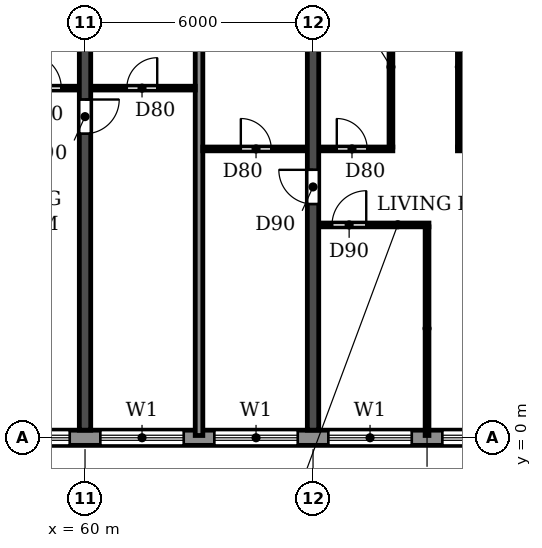
"""IFC4 building model, lengths in metres.
Left out: names, types, materials, properties, quantities, classifications, styles, units other than length and angle.
Written with IfcOpenShell. Run it as: python <this file> out.ifc"""

import sys

from ifc_helpers import new_model, si_unit, direction, frame, frame_2d, origin, place, context, subcontext, project, spatial, rectangle, extrude, element, fill, save


model = new_model("IFC4")
c1 = context("Model", 3, precision=1e-05, world=origin(), true_north=direction((0.0, 1.0)))
c2 = subcontext(c1, "Body", "Model", "MODEL_VIEW")
j1 = project(units=[si_unit("LENGTHUNIT", "METRE"), si_unit("PLANEANGLEUNIT", "RADIAN")], contexts=[c1])
p1 = place(None, origin())
s1 = spatial("IfcSite", under=j1, at=p1, CompositionType="ELEMENT")
p2 = place(p1, origin())
s2 = spatial("IfcBuilding", under=s1, at=p2, CompositionType="ELEMENT")
p3 = place(p2, frame((0.0, 0.0, 162.0)))
s3 = spatial("IfcBuildingStorey", under=s2, at=p3, CompositionType="ELEMENT", Elevation=162.0)
p4 = place(p3, frame((60.0, 0.2, 0.0), z_axis=(0.0, 0.0, 1.0), x_axis=(0.0, 1.0, 0.0)))
e1 = element("IfcWall", 1, at=p4, inside=s3, PredefinedType="SHEAR", context=c2, shape_type="SweptSolid", body=[
    extrude(rectangle(XDim=11.675, YDim=0.3, at=frame_2d((5.837, 0.0))), origin(), (0.0, 0.0, 1.0), 2.95),
])
p5 = place(p4, frame((7.8, 0.0, 0.0)))
e2 = element("IfcOpeningElement", 2, at=p5, cuts=e1, PredefinedType="OPENING", context=c2, shape_type="SweptSolid", body=[
    extrude(rectangle(XDim=0.9, YDim=2.1, at=frame_2d((0.45, 1.05))), frame((0.0, 0.16, 0.0), z_axis=(0.0, -1.0, 0.0), x_axis=(1.0, 0.0, 0.0)), (0.0, 0.0, 1.0), 0.32),
])
p6 = place(p3, frame((66.0, 0.2, 0.0), z_axis=(0.0, 0.0, 1.0), x_axis=(0.0, 1.0, 0.0)))
e3 = element("IfcWall", 3, at=p6, inside=s3, PredefinedType="SHEAR", context=c2, shape_type="SweptSolid", body=[
    extrude(rectangle(XDim=11.675, YDim=0.3, at=frame_2d((5.837, 0.0))), origin(), (0.0, 0.0, 1.0), 2.95),
])
p7 = place(p6, frame((5.95, 0.0, 0.0)))
e4 = element("IfcOpeningElement", 4, at=p7, cuts=e3, PredefinedType="OPENING", context=c2, shape_type="SweptSolid", body=[
    extrude(rectangle(XDim=0.9, YDim=2.1, at=frame_2d((0.45, 1.05))), frame((0.0, 0.16, 0.0), z_axis=(0.0, -1.0, 0.0), x_axis=(1.0, 0.0, 0.0)), (0.0, 0.0, 1.0), 0.32),
])
p8 = place(p3, frame((22.683, 0.0, 0.0), z_axis=(0.0, 0.0, 1.0), x_axis=(1.0, 0.0, 0.0)))
e5 = element("IfcWall", 5, at=p8, inside=s3, PredefinedType="STANDARD", context=c2, shape_type="SweptSolid", body=[
    extrude(rectangle(XDim=56.634, YDim=0.4, at=frame_2d((28.317, 0.0))), origin(), (0.0, 0.0, 1.0), 2.95),
])
p9 = place(p8, frame((1.717, 0.0, 0.9)))
e6 = element("IfcOpeningElement", 6, at=p9, cuts=e5, PredefinedType="OPENING", context=c2, shape_type="SweptSolid", body=[
    extrude(rectangle(XDim=2.2, YDim=1.5, at=frame_2d((1.1, 0.75))), frame((0.0, 0.21, 0.0), z_axis=(0.0, -1.0, 0.0), x_axis=(1.0, 0.0, 0.0)), (0.0, 0.0, 1.0), 0.42),
])
p10 = place(p8, frame((4.917, 0.0, 0.0)))
e7 = element("IfcOpeningElement", 7, at=p10, cuts=e5, PredefinedType="OPENING", context=c2, shape_type="SweptSolid", body=[
    extrude(rectangle(XDim=1.8, YDim=2.4, at=frame_2d((0.9, 1.2))), frame((0.0, 0.21, 0.0), z_axis=(0.0, -1.0, 0.0), x_axis=(1.0, 0.0, 0.0)), (0.0, 0.0, 1.0), 0.42),
])
p11 = place(p8, frame((7.717, 0.0, 0.9)))
e8 = element("IfcOpeningElement", 8, at=p11, cuts=e5, PredefinedType="OPENING", context=c2, shape_type="SweptSolid", body=[
    extrude(rectangle(XDim=2.2, YDim=1.5, at=frame_2d((1.1, 0.75))), frame((0.0, 0.21, 0.0), z_axis=(0.0, -1.0, 0.0), x_axis=(1.0, 0.0, 0.0)), (0.0, 0.0, 1.0), 0.42),
])
p12 = place(p8, frame((10.717, 0.0, 0.9)))
e9 = element("IfcOpeningElement", 9, at=p12, cuts=e5, PredefinedType="OPENING", context=c2, shape_type="SweptSolid", body=[
    extrude(rectangle(XDim=2.2, YDim=1.5, at=frame_2d((1.1, 0.75))), frame((0.0, 0.21, 0.0), z_axis=(0.0, -1.0, 0.0), x_axis=(1.0, 0.0, 0.0)), (0.0, 0.0, 1.0), 0.42),
])
p13 = place(p8, frame((13.717, 0.0, 0.9)))
e10 = element("IfcOpeningElement", 10, at=p13, cuts=e5, PredefinedType="OPENING", context=c2, shape_type="SweptSolid", body=[
    extrude(rectangle(XDim=2.2, YDim=1.5, at=frame_2d((1.1, 0.75))), frame((0.0, 0.21, 0.0), z_axis=(0.0, -1.0, 0.0), x_axis=(1.0, 0.0, 0.0)), (0.0, 0.0, 1.0), 0.42),
])
p14 = place(p8, frame((16.917, 0.0, 0.0)))
e11 = element("IfcOpeningElement", 11, at=p14, cuts=e5, PredefinedType="OPENING", context=c2, shape_type="SweptSolid", body=[
    extrude(rectangle(XDim=1.8, YDim=2.4, at=frame_2d((0.9, 1.2))), frame((0.0, 0.21, 0.0), z_axis=(0.0, -1.0, 0.0), x_axis=(1.0, 0.0, 0.0)), (0.0, 0.0, 1.0), 0.42),
])
p15 = place(p8, frame((19.717, 0.0, 0.9)))
e12 = element("IfcOpeningElement", 12, at=p15, cuts=e5, PredefinedType="OPENING", context=c2, shape_type="SweptSolid", body=[
    extrude(rectangle(XDim=2.2, YDim=1.5, at=frame_2d((1.1, 0.75))), frame((0.0, 0.21, 0.0), z_axis=(0.0, -1.0, 0.0), x_axis=(1.0, 0.0, 0.0)), (0.0, 0.0, 1.0), 0.42),
])
p16 = place(p8, frame((22.717, 0.0, 0.9)))
e13 = element("IfcOpeningElement", 13, at=p16, cuts=e5, PredefinedType="OPENING", context=c2, shape_type="SweptSolid", body=[
    extrude(rectangle(XDim=2.2, YDim=1.5, at=frame_2d((1.1, 0.75))), frame((0.0, 0.21, 0.0), z_axis=(0.0, -1.0, 0.0), x_axis=(1.0, 0.0, 0.0)), (0.0, 0.0, 1.0), 0.42),
])
p17 = place(p8, frame((25.717, 0.0, 0.9)))
e14 = element("IfcOpeningElement", 14, at=p17, cuts=e5, PredefinedType="OPENING", context=c2, shape_type="SweptSolid", body=[
    extrude(rectangle(XDim=2.2, YDim=1.5, at=frame_2d((1.1, 0.75))), frame((0.0, 0.21, 0.0), z_axis=(0.0, -1.0, 0.0), x_axis=(1.0, 0.0, 0.0)), (0.0, 0.0, 1.0), 0.42),
])
p18 = place(p8, frame((28.717, 0.0, 0.9)))
e15 = element("IfcOpeningElement", 15, at=p18, cuts=e5, PredefinedType="OPENING", context=c2, shape_type="SweptSolid", body=[
    extrude(rectangle(XDim=2.2, YDim=1.5, at=frame_2d((1.1, 0.75))), frame((0.0, 0.21, 0.0), z_axis=(0.0, -1.0, 0.0), x_axis=(1.0, 0.0, 0.0)), (0.0, 0.0, 1.0), 0.42),
])
p19 = place(p8, frame((31.717, 0.0, 0.9)))
e16 = element("IfcOpeningElement", 16, at=p19, cuts=e5, PredefinedType="OPENING", context=c2, shape_type="SweptSolid", body=[
    extrude(rectangle(XDim=2.2, YDim=1.5, at=frame_2d((1.1, 0.75))), frame((0.0, 0.21, 0.0), z_axis=(0.0, -1.0, 0.0), x_axis=(1.0, 0.0, 0.0)), (0.0, 0.0, 1.0), 0.42),
])
p20 = place(p8, frame((34.717, 0.0, 0.9)))
e17 = element("IfcOpeningElement", 17, at=p20, cuts=e5, PredefinedType="OPENING", context=c2, shape_type="SweptSolid", body=[
    extrude(rectangle(XDim=2.2, YDim=1.5, at=frame_2d((1.1, 0.75))), frame((0.0, 0.21, 0.0), z_axis=(0.0, -1.0, 0.0), x_axis=(1.0, 0.0, 0.0)), (0.0, 0.0, 1.0), 0.42),
])
p21 = place(p8, frame((37.717, 0.0, 0.9)))
e18 = element("IfcOpeningElement", 18, at=p21, cuts=e5, PredefinedType="OPENING", context=c2, shape_type="SweptSolid", body=[
    extrude(rectangle(XDim=2.2, YDim=1.5, at=frame_2d((1.1, 0.75))), frame((0.0, 0.21, 0.0), z_axis=(0.0, -1.0, 0.0), x_axis=(1.0, 0.0, 0.0)), (0.0, 0.0, 1.0), 0.42),
])
p22 = place(p8, frame((40.717, 0.0, 0.9)))
e19 = element("IfcOpeningElement", 19, at=p22, cuts=e5, PredefinedType="OPENING", context=c2, shape_type="SweptSolid", body=[
    extrude(rectangle(XDim=2.2, YDim=1.5, at=frame_2d((1.1, 0.75))), frame((0.0, 0.21, 0.0), z_axis=(0.0, -1.0, 0.0), x_axis=(1.0, 0.0, 0.0)), (0.0, 0.0, 1.0), 0.42),
])
p23 = place(p8, frame((43.717, 0.0, 0.9)))
e20 = element("IfcOpeningElement", 20, at=p23, cuts=e5, PredefinedType="OPENING", context=c2, shape_type="SweptSolid", body=[
    extrude(rectangle(XDim=2.2, YDim=1.5, at=frame_2d((1.1, 0.75))), frame((0.0, 0.21, 0.0), z_axis=(0.0, -1.0, 0.0), x_axis=(1.0, 0.0, 0.0)), (0.0, 0.0, 1.0), 0.42),
])
p24 = place(p8, frame((46.717, 0.0, 0.9)))
e21 = element("IfcOpeningElement", 21, at=p24, cuts=e5, PredefinedType="OPENING", context=c2, shape_type="SweptSolid", body=[
    extrude(rectangle(XDim=2.2, YDim=1.5, at=frame_2d((1.1, 0.75))), frame((0.0, 0.21, 0.0), z_axis=(0.0, -1.0, 0.0), x_axis=(1.0, 0.0, 0.0)), (0.0, 0.0, 1.0), 0.42),
])
p25 = place(p8, frame((49.917, 0.0, 0.0)))
e22 = element("IfcOpeningElement", 22, at=p25, cuts=e5, PredefinedType="OPENING", context=c2, shape_type="SweptSolid", body=[
    extrude(rectangle(XDim=1.8, YDim=2.4, at=frame_2d((0.9, 1.2))), frame((0.0, 0.21, 0.0), z_axis=(0.0, -1.0, 0.0), x_axis=(1.0, 0.0, 0.0)), (0.0, 0.0, 1.0), 0.42),
])
p26 = place(p8, frame((52.717, 0.0, 0.9)))
e23 = element("IfcOpeningElement", 23, at=p26, cuts=e5, PredefinedType="OPENING", context=c2, shape_type="SweptSolid", body=[
    extrude(rectangle(XDim=2.2, YDim=1.5, at=frame_2d((1.1, 0.75))), frame((0.0, 0.21, 0.0), z_axis=(0.0, -1.0, 0.0), x_axis=(1.0, 0.0, 0.0)), (0.0, 0.0, 1.0), 0.42),
])
p27 = place(p3, frame((63.0, 0.06, 0.0), z_axis=(0.0, 0.0, 1.0), x_axis=(0.0, 1.0, 0.0)))
e24 = element("IfcWall", 24, at=p27, inside=s3, PredefinedType="PARTITIONING", context=c2, shape_type="SweptSolid", body=[
    extrude(rectangle(XDim=11.805, YDim=0.2, at=frame_2d((5.902, 0.0))), origin(), (0.0, 0.0, 1.0), 2.95),
])
p28 = place(p3, frame((66.16, 5.6, 0.0), z_axis=(0.0, 0.0, 1.0), x_axis=(1.0, 0.0, 0.0)))
e25 = element("IfcWall", 25, at=p28, inside=s3, PredefinedType="PARTITIONING", context=c2, shape_type="SweptSolid", body=[
    extrude(rectangle(XDim=2.89, YDim=0.1, at=frame_2d((1.445, 0.0))), origin(), (0.0, 0.0, 1.0), 2.95),
])
p29 = place(p28, frame((0.34, 0.0, 0.0)))
e26 = element("IfcOpeningElement", 26, at=p29, cuts=e25, PredefinedType="OPENING", context=c2, shape_type="SweptSolid", body=[
    extrude(rectangle(XDim=0.9, YDim=2.1, at=frame_2d((0.45, 1.05))), frame((0.0, 0.06, 0.0), z_axis=(0.0, -1.0, 0.0), x_axis=(1.0, 0.0, 0.0)), (0.0, 0.0, 1.0), 0.12),
])
p30 = place(p3, frame((63.1, 7.6, 0.0), z_axis=(0.0, 0.0, 1.0), x_axis=(1.0, 0.0, 0.0)))
e27 = element("IfcWall", 27, at=p30, inside=s3, PredefinedType="PARTITIONING", context=c2, shape_type="SweptSolid", body=[
    extrude(rectangle(XDim=2.74, YDim=0.1, at=frame_2d((1.37, 0.0))), origin(), (0.0, 0.0, 1.0), 2.95),
])
p31 = place(p30, frame((1.0, 0.0, 0.0)))
e28 = element("IfcOpeningElement", 28, at=p31, cuts=e27, PredefinedType="OPENING", context=c2, shape_type="SweptSolid", body=[
    extrude(rectangle(XDim=0.8, YDim=2.1, at=frame_2d((0.4, 1.05))), frame((0.0, 0.06, 0.0), z_axis=(0.0, -1.0, 0.0), x_axis=(1.0, 0.0, 0.0)), (0.0, 0.0, 1.0), 0.12),
])
p32 = place(p3, frame((66.16, 7.6, 0.0), z_axis=(0.0, 0.0, 1.0), x_axis=(1.0, 0.0, 0.0)))
e29 = element("IfcWall", 29, at=p32, inside=s3, PredefinedType="PARTITIONING", context=c2, shape_type="SweptSolid", body=[
    extrude(rectangle(XDim=1.94, YDim=0.1, at=frame_2d((0.97, 0.0))), origin(), (0.0, 0.0, 1.0), 2.95),
])
p33 = place(p32, frame((0.465, 0.0, 0.0)))
e30 = element("IfcOpeningElement", 30, at=p33, cuts=e29, PredefinedType="OPENING", context=c2, shape_type="SweptSolid", body=[
    extrude(rectangle(XDim=0.8, YDim=2.1, at=frame_2d((0.4, 1.05))), frame((0.0, 0.06, 0.0), z_axis=(0.0, -1.0, 0.0), x_axis=(1.0, 0.0, 0.0)), (0.0, 0.0, 1.0), 0.12),
])
p34 = place(p3, frame((69.8, 7.6, 0.0), z_axis=(0.0, 0.0, 1.0), x_axis=(1.0, 0.0, 0.0)))
e31 = element("IfcWall", 31, at=p34, inside=s3, PredefinedType="PARTITIONING", context=c2, shape_type="SweptSolid", body=[
    extrude(rectangle(XDim=2.04, YDim=0.1, at=frame_2d((1.02, 0.0))), origin(), (0.0, 0.0, 1.0), 2.95),
])
p35 = place(p34, frame((0.675, 0.0, 0.0)))
e32 = element("IfcOpeningElement", 32, at=p35, cuts=e31, PredefinedType="OPENING", context=c2, shape_type="SweptSolid", body=[
    extrude(rectangle(XDim=0.9, YDim=2.1, at=frame_2d((0.45, 1.05))), frame((0.0, 0.06, 0.0), z_axis=(0.0, -1.0, 0.0), x_axis=(1.0, 0.0, 0.0)), (0.0, 0.0, 1.0), 0.12),
])
p36 = place(p3, frame((57.8, 9.2, 0.0), z_axis=(0.0, 0.0, 1.0), x_axis=(1.0, 0.0, 0.0)))
e33 = element("IfcWall", 33, at=p36, inside=s3, PredefinedType="PARTITIONING", context=c2, shape_type="SweptSolid", body=[
    extrude(rectangle(XDim=2.04, YDim=0.1, at=frame_2d((1.02, 0.0))), origin(), (0.0, 0.0, 1.0), 2.95),
])
p37 = place(p36, frame((0.675, 0.0, 0.0)))
e34 = element("IfcOpeningElement", 34, at=p37, cuts=e33, PredefinedType="OPENING", context=c2, shape_type="SweptSolid", body=[
    extrude(rectangle(XDim=0.9, YDim=2.1, at=frame_2d((0.45, 1.05))), frame((0.0, 0.06, 0.0), z_axis=(0.0, -1.0, 0.0), x_axis=(1.0, 0.0, 0.0)), (0.0, 0.0, 1.0), 0.12),
])
p38 = place(p3, frame((60.16, 9.2, 0.0), z_axis=(0.0, 0.0, 1.0), x_axis=(1.0, 0.0, 0.0)))
e35 = element("IfcWall", 35, at=p38, inside=s3, PredefinedType="PARTITIONING", context=c2, shape_type="SweptSolid", body=[
    extrude(rectangle(XDim=2.74, YDim=0.1, at=frame_2d((1.37, 0.0))), origin(), (0.0, 0.0, 1.0), 2.95),
])
p39 = place(p38, frame((0.94, 0.0, 0.0)))
e36 = element("IfcOpeningElement", 36, at=p39, cuts=e35, PredefinedType="OPENING", context=c2, shape_type="SweptSolid", body=[
    extrude(rectangle(XDim=0.8, YDim=2.1, at=frame_2d((0.4, 1.05))), frame((0.0, 0.06, 0.0), z_axis=(0.0, -1.0, 0.0), x_axis=(1.0, 0.0, 0.0)), (0.0, 0.0, 1.0), 0.12),
])
p40 = place(p3, frame((68.05, 7.65, 0.0), z_axis=(0.0, 0.0, 1.0), x_axis=(0.0, 1.0, 0.0)))
e37 = element("IfcWall", 37, at=p40, inside=s3, PredefinedType="PARTITIONING", context=c2, shape_type="SweptSolid", body=[
    extrude(rectangle(XDim=4.215, YDim=0.1, at=frame_2d((2.107, 0.0))), origin(), (0.0, 0.0, 1.0), 2.95),
])
p41 = place(p3, frame((69.0, 0.06, 0.0), z_axis=(0.0, 0.0, 1.0), x_axis=(0.0, 1.0, 0.0)))
e38 = element("IfcWall", 38, at=p41, inside=s3, PredefinedType="PARTITIONING", context=c2, shape_type="SweptSolid", body=[
    extrude(rectangle(XDim=5.49, YDim=0.1, at=frame_2d((2.745, 0.0))), origin(), (0.0, 0.0, 1.0), 2.95),
])
p42 = place(p3, frame((69.85, 7.65, 0.0), z_axis=(0.0, 0.0, 1.0), x_axis=(0.0, 1.0, 0.0)))
e39 = element("IfcWall", 39, at=p42, inside=s3, PredefinedType="PARTITIONING", context=c2, shape_type="SweptSolid", body=[
    extrude(rectangle(XDim=4.215, YDim=0.1, at=frame_2d((2.107, 0.0))), origin(), (0.0, 0.0, 1.0), 2.95),
])
p43 = place(p20, origin())
e40 = element("IfcWindow", 40, at=p43, inside=s3, PartitioningType="DOUBLE_PANEL_HORIZONTAL", PredefinedType="WINDOW", context=c2, shape_type="SweptSolid", body=[
    extrude(rectangle(XDim=2.2, YDim=1.5, at=frame_2d((1.1, 0.75))), frame((0.0, 0.03, 0.0), z_axis=(0.0, -1.0, 0.0), x_axis=(1.0, 0.0, 0.0)), (0.0, 0.0, 1.0), 0.06),
])
fill(e17, e40)
p44 = place(p21, origin())
e41 = element("IfcWindow", 41, at=p44, inside=s3, PartitioningType="DOUBLE_PANEL_HORIZONTAL", PredefinedType="WINDOW", context=c2, shape_type="SweptSolid", body=[
    extrude(rectangle(XDim=2.2, YDim=1.5, at=frame_2d((1.1, 0.75))), frame((0.0, 0.03, 0.0), z_axis=(0.0, -1.0, 0.0), x_axis=(1.0, 0.0, 0.0)), (0.0, 0.0, 1.0), 0.06),
])
fill(e18, e41)
p45 = place(p22, origin())
e42 = element("IfcWindow", 42, at=p45, inside=s3, PartitioningType="DOUBLE_PANEL_HORIZONTAL", PredefinedType="WINDOW", context=c2, shape_type="SweptSolid", body=[
    extrude(rectangle(XDim=2.2, YDim=1.5, at=frame_2d((1.1, 0.75))), frame((0.0, 0.03, 0.0), z_axis=(0.0, -1.0, 0.0), x_axis=(1.0, 0.0, 0.0)), (0.0, 0.0, 1.0), 0.06),
])
fill(e19, e42)
p46 = place(p23, origin())
e43 = element("IfcWindow", 43, at=p46, inside=s3, PartitioningType="DOUBLE_PANEL_HORIZONTAL", PredefinedType="WINDOW", context=c2, shape_type="SweptSolid", body=[
    extrude(rectangle(XDim=2.2, YDim=1.5, at=frame_2d((1.1, 0.75))), frame((0.0, 0.03, 0.0), z_axis=(0.0, -1.0, 0.0), x_axis=(1.0, 0.0, 0.0)), (0.0, 0.0, 1.0), 0.06),
])
fill(e20, e43)
p47 = place(p24, origin())
e44 = element("IfcWindow", 44, at=p47, inside=s3, PartitioningType="DOUBLE_PANEL_HORIZONTAL", PredefinedType="WINDOW", context=c2, shape_type="SweptSolid", body=[
    extrude(rectangle(XDim=2.2, YDim=1.5, at=frame_2d((1.1, 0.75))), frame((0.0, 0.03, 0.0), z_axis=(0.0, -1.0, 0.0), x_axis=(1.0, 0.0, 0.0)), (0.0, 0.0, 1.0), 0.06),
])
fill(e21, e44)
p48 = place(p39, origin())
e45 = element("IfcDoor", 45, at=p48, inside=s3, OperationType="SINGLE_SWING_RIGHT", PredefinedType="DOOR", context=c2, shape_type="SweptSolid", body=[
    extrude(rectangle(XDim=0.8, YDim=2.1, at=frame_2d((0.4, 1.05))), frame((0.0, 0.025, 0.0), z_axis=(0.0, -1.0, 0.0), x_axis=(1.0, 0.0, 0.0)), (0.0, 0.0, 1.0), 0.05),
])
fill(e36, e45)
p49 = place(p37, origin())
e46 = element("IfcDoor", 46, at=p49, inside=s3, OperationType="SINGLE_SWING_LEFT", PredefinedType="DOOR", context=c2, shape_type="SweptSolid", body=[
    extrude(rectangle(XDim=0.9, YDim=2.1, at=frame_2d((0.45, 1.05))), frame((0.0, 0.025, 0.0), z_axis=(0.0, -1.0, 0.0), x_axis=(1.0, 0.0, 0.0)), (0.0, 0.0, 1.0), 0.05),
])
fill(e34, e46)
p50 = place(p5, frame((0.9, 0.0, 0.0), z_axis=(0.0, 0.0, 1.0), x_axis=(-1.0, 0.0, 0.0)))
e47 = element("IfcDoor", 47, at=p50, inside=s3, OperationType="SINGLE_SWING_LEFT", PredefinedType="DOOR", context=c2, shape_type="SweptSolid", body=[
    extrude(rectangle(XDim=0.9, YDim=2.1, at=frame_2d((0.45, 1.05))), frame((0.0, 0.025, 0.0), z_axis=(0.0, -1.0, 0.0), x_axis=(1.0, 0.0, 0.0)), (0.0, 0.0, 1.0), 0.05),
])
fill(e2, e47)
p51 = place(p31, origin())
e48 = element("IfcDoor", 48, at=p51, inside=s3, OperationType="SINGLE_SWING_LEFT", PredefinedType="DOOR", context=c2, shape_type="SweptSolid", body=[
    extrude(rectangle(XDim=0.8, YDim=2.1, at=frame_2d((0.4, 1.05))), frame((0.0, 0.025, 0.0), z_axis=(0.0, -1.0, 0.0), x_axis=(1.0, 0.0, 0.0)), (0.0, 0.0, 1.0), 0.05),
])
fill(e28, e48)
p52 = place(p7, origin())
e49 = element("IfcDoor", 49, at=p52, inside=s3, OperationType="SINGLE_SWING_RIGHT", PredefinedType="DOOR", context=c2, shape_type="SweptSolid", body=[
    extrude(rectangle(XDim=0.9, YDim=2.1, at=frame_2d((0.45, 1.05))), frame((0.0, 0.025, 0.0), z_axis=(0.0, -1.0, 0.0), x_axis=(1.0, 0.0, 0.0)), (0.0, 0.0, 1.0), 0.05),
])
fill(e4, e49)
p53 = place(p29, origin())
e50 = element("IfcDoor", 50, at=p53, inside=s3, OperationType="SINGLE_SWING_RIGHT", PredefinedType="DOOR", context=c2, shape_type="SweptSolid", body=[
    extrude(rectangle(XDim=0.9, YDim=2.1, at=frame_2d((0.45, 1.05))), frame((0.0, 0.025, 0.0), z_axis=(0.0, -1.0, 0.0), x_axis=(1.0, 0.0, 0.0)), (0.0, 0.0, 1.0), 0.05),
])
fill(e26, e50)
p54 = place(p33, origin())
e51 = element("IfcDoor", 51, at=p54, inside=s3, OperationType="SINGLE_SWING_LEFT", PredefinedType="DOOR", context=c2, shape_type="SweptSolid", body=[
    extrude(rectangle(XDim=0.8, YDim=2.1, at=frame_2d((0.4, 1.05))), frame((0.0, 0.025, 0.0), z_axis=(0.0, -1.0, 0.0), x_axis=(1.0, 0.0, 0.0)), (0.0, 0.0, 1.0), 0.05),
])
fill(e30, e51)
save(model, sys.argv[1])
